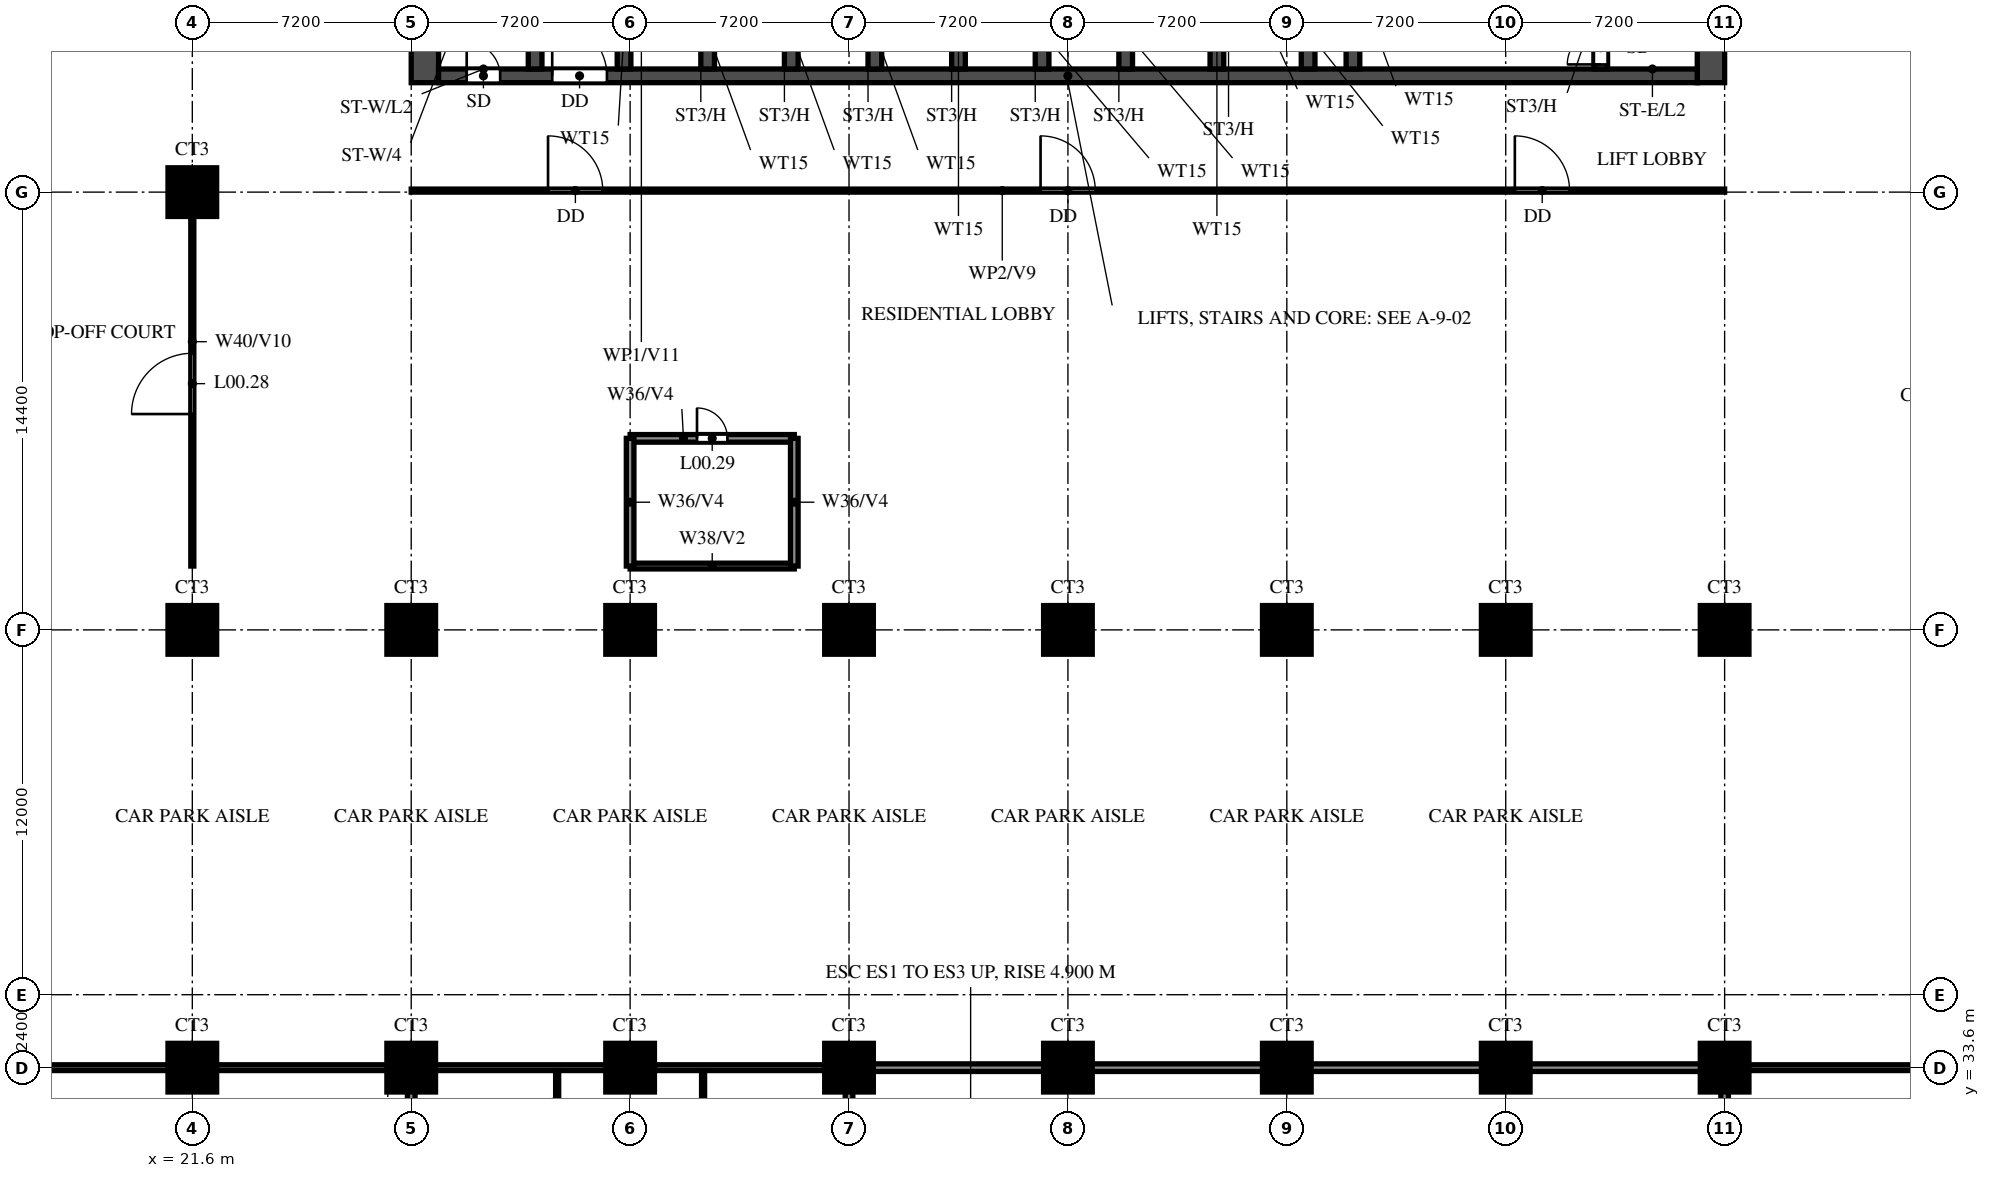
"""IFC4 building model, lengths in metres.
Left out: names, types, materials, properties, quantities, classifications, styles, units other than length and angle.
Written with IfcOpenShell. Run it as: python <this file> out.ifc"""

import sys

from ifc_helpers import new_model, si_unit, direction, frame, frame_2d, origin, origin_2d, place, context, subcontext, project, spatial, rectangle, circle, extrude, source, transform, mapped, element, fill, save


model = new_model("IFC4")
c1 = context("Model", 3, precision=1e-05, world=origin(), true_north=direction((0.0, 1.0)))
c2 = subcontext(c1, "Body", "Model", "MODEL_VIEW")
j1 = project(units=[si_unit("LENGTHUNIT", "METRE"), si_unit("PLANEANGLEUNIT", "RADIAN")], contexts=[c1])
p1 = place(None, origin())
s1 = spatial("IfcSite", under=j1, at=p1, CompositionType="ELEMENT")
p2 = place(p1, origin())
s2 = spatial("IfcBuilding", under=s1, at=p2, CompositionType="ELEMENT")
p3 = place(p2, origin())
s3 = spatial("IfcBuildingStorey", under=s2, at=p3, CompositionType="ELEMENT", Elevation=0.0)
m1 = source(origin(), c2, "Body", "SweptSolid", [
    extrude(circle(Radius=0.8, at=origin_2d()), origin(), (0.0, 0.0, 1.0), 7.4),
])
for number, where, z_axis, x_axis in (
    (1, (21.6, 33.6, 0.0), (0.0, 0.0, 1.0), (1.0, 0.0, 0.0)),
    (2, (28.8, 33.6, 0.0), (0.0, 0.0, 1.0), (1.0, 0.0, 0.0)),
    (3, (36.0, 33.6, 0.0), (0.0, 0.0, 1.0), (1.0, 0.0, 0.0)),
    (4, (43.2, 33.6, 0.0), (0.0, 0.0, 1.0), (1.0, 0.0, 0.0)),
    (5, (50.4, 33.6, 0.0), (0.0, 0.0, 1.0), (1.0, 0.0, 0.0)),
    (6, (57.6, 33.6, 0.0), (0.0, 0.0, 1.0), (1.0, 0.0, 0.0)),
    (7, (64.8, 33.6, 0.0), (0.0, 0.0, 1.0), (1.0, 0.0, 0.0)),
    (8, (72.0, 33.6, 0.0), (0.0, 0.0, 1.0), (1.0, 0.0, 0.0)),
    (9, (21.6, 48.0, 0.0), (0.0, 0.0, 1.0), (1.0, 0.0, 0.0)),
    (10, (28.8, 48.0, 0.0), (0.0, 0.0, 1.0), (1.0, 0.0, 0.0)),
    (11, (36.0, 48.0, 0.0), (0.0, 0.0, 1.0), (1.0, 0.0, 0.0)),
    (12, (43.2, 48.0, 0.0), (0.0, 0.0, 1.0), (1.0, 0.0, 0.0)),
    (13, (50.4, 48.0, 0.0), (0.0, 0.0, 1.0), (1.0, 0.0, 0.0)),
    (14, (57.6, 48.0, 0.0), (0.0, 0.0, 1.0), (1.0, 0.0, 0.0)),
    (15, (64.8, 48.0, 0.0), (0.0, 0.0, 1.0), (1.0, 0.0, 0.0)),
    (16, (72.0, 48.0, 0.0), (0.0, 0.0, 1.0), (1.0, 0.0, 0.0)),
    (17, (21.6, 62.4, 0.0), (0.0, 0.0, 1.0), (1.0, 0.0, 0.0)),
):
    element("IfcColumn", number, at=place(p3, frame(where, z_axis=z_axis, x_axis=x_axis)), inside=s3, PredefinedType="COLUMN", context=c2, shape_type="MappedRepresentation", body=[
        mapped(m1, transform((0.0, 0.0, 0.0))),
    ])
for number, where, z_axis, x_axis in (
    (18, (29.25, 66.0, 0.0), (0.0, 0.0, 1.0), (0.0, 1.0, 0.0)),
    (19, (71.55, 66.0, 0.0), (0.0, 0.0, 1.0), (0.0, 1.0, 0.0)),
):
    element("IfcWall", number, at=place(p3, frame(where, z_axis=z_axis, x_axis=x_axis)), inside=s3, PredefinedType="SHEAR", context=c2, shape_type="SweptSolid", body=[
        extrude(rectangle(XDim=12.0, YDim=0.9, at=frame_2d((6.0, 0.0))), origin(), (0.0, 0.0, 1.0), 7.4),
    ])
p4 = place(p3, frame((29.7, 66.225, 0.0), z_axis=(0.0, 0.0, 1.0), x_axis=(1.0, 0.0, 0.0)))
e20 = element("IfcWall", 20, at=p4, inside=s3, PredefinedType="SHEAR", context=c2, shape_type="SweptSolid", body=[
    extrude(rectangle(XDim=41.4, YDim=0.45, at=frame_2d((20.7, 0.0))), origin(), (0.0, 0.0, 1.0), 7.4),
])
p5 = place(p4, frame((0.925, 0.0, 0.0)))
e21 = element("IfcOpeningElement", 21, at=p5, cuts=e20, PredefinedType="OPENING", context=c2, shape_type="SweptSolid", body=[
    extrude(rectangle(XDim=1.1, YDim=2.1, at=frame_2d((0.55, 1.05))), frame((0.0, 0.235, 0.0), z_axis=(0.0, -1.0, 0.0), x_axis=(1.0, 0.0, 0.0)), (0.0, 0.0, 1.0), 0.47),
])
p6 = place(p4, frame((3.738, 0.0, 0.0)))
e22 = element("IfcOpeningElement", 22, at=p6, cuts=e20, PredefinedType="OPENING", context=c2, shape_type="SweptSolid", body=[
    extrude(rectangle(XDim=1.8, YDim=2.1, at=frame_2d((0.9, 1.05))), frame((0.0, 0.235, 0.0), z_axis=(0.0, -1.0, 0.0), x_axis=(1.0, 0.0, 0.0)), (0.0, 0.0, 1.0), 0.47),
])
p7 = place(p3, frame((32.875, 66.45, 0.0), z_axis=(0.0, 0.0, 1.0), x_axis=(0.0, 1.0, 0.0)))
e23 = element("IfcWall", 23, at=p7, inside=s3, PredefinedType="SHEAR", context=c2, shape_type="SweptSolid", body=[
    extrude(rectangle(XDim=10.65, YDim=0.45, at=frame_2d((5.325, 0.0))), origin(), (0.0, 0.0, 1.0), 7.4),
])
p8 = place(p3, frame((67.925, 66.45, 0.0), z_axis=(0.0, 0.0, 1.0), x_axis=(0.0, 1.0, 0.0)))
e24 = element("IfcWall", 24, at=p8, inside=s3, PredefinedType="SHEAR", context=c2, shape_type="SweptSolid", body=[
    extrude(rectangle(XDim=10.65, YDim=0.45, at=frame_2d((5.325, 0.0))), origin(), (0.0, 0.0, 1.0), 7.4),
])
p9 = place(p8, frame((0.15, 0.0, 0.0)))
e25 = element("IfcOpeningElement", 25, at=p9, cuts=e24, PredefinedType="OPENING", context=c2, shape_type="SweptSolid", body=[
    extrude(rectangle(XDim=1.1, YDim=2.1, at=frame_2d((0.55, 1.05))), frame((0.0, 0.235, 0.0), z_axis=(0.0, -1.0, 0.0), x_axis=(1.0, 0.0, 0.0)), (0.0, 0.0, 1.0), 0.47),
])
p10 = place(p3, frame((59.775, 66.45, 0.0), z_axis=(0.0, 0.0, 1.0), x_axis=(0.0, 1.0, 0.0)))
e26 = element("IfcWall", 26, at=p10, inside=s3, PredefinedType="SHEAR", context=c2, shape_type="SweptSolid", body=[
    extrude(rectangle(XDim=6.025, YDim=0.45, at=frame_2d((3.013, 0.0))), origin(), (0.0, 0.0, 1.0), 7.4),
])
p11 = place(p10, frame((3.85, 0.0, 0.0)))
e27 = element("IfcOpeningElement", 27, at=p11, cuts=e26, PredefinedType="OPENING", context=c2, shape_type="SweptSolid", body=[
    extrude(rectangle(XDim=1.2, YDim=2.1, at=frame_2d((0.6, 1.05))), frame((0.0, 0.235, 0.0), z_axis=(0.0, -1.0, 0.0), x_axis=(1.0, 0.0, 0.0)), (0.0, 0.0, 1.0), 0.47),
])
for number, where, z_axis, x_axis in (
    (28, (35.8, 66.45, 0.0), (0.0, 0.0, 1.0), (0.0, 1.0, 0.0)),
    (29, (38.55, 66.45, 0.0), (0.0, 0.0, 1.0), (0.0, 1.0, 0.0)),
    (30, (41.3, 66.45, 0.0), (0.0, 0.0, 1.0), (0.0, 1.0, 0.0)),
    (31, (44.05, 66.45, 0.0), (0.0, 0.0, 1.0), (0.0, 1.0, 0.0)),
    (32, (46.8, 66.45, 0.0), (0.0, 0.0, 1.0), (0.0, 1.0, 0.0)),
    (33, (49.55, 66.45, 0.0), (0.0, 0.0, 1.0), (0.0, 1.0, 0.0)),
    (34, (52.3, 66.45, 0.0), (0.0, 0.0, 1.0), (0.0, 1.0, 0.0)),
    (35, (55.3, 66.45, 0.0), (0.0, 0.0, 1.0), (0.0, 1.0, 0.0)),
    (36, (58.3, 66.45, 0.0), (0.0, 0.0, 1.0), (0.0, 1.0, 0.0)),
):
    element("IfcWall", number, at=place(p3, frame(where, z_axis=z_axis, x_axis=x_axis)), inside=s3, PredefinedType="SHEAR", context=c2, shape_type="SweptSolid", body=[
        extrude(rectangle(XDim=2.425, YDim=0.45, at=frame_2d((1.212, 0.0))), origin(), (0.0, 0.0, 1.0), 7.4),
    ])
p12 = place(p3, frame((28.8, 62.45, 0.0), z_axis=(0.0, 0.0, 1.0), x_axis=(1.0, 0.0, 0.0)))
e37 = element("IfcWall", 37, at=p12, inside=s3, PredefinedType="PARTITIONING", context=c2, shape_type="SweptSolid", body=[
    extrude(rectangle(XDim=43.2, YDim=0.1, at=frame_2d((21.6, 0.0))), origin(), (0.0, 0.0, 1.0), 7.4),
])
p13 = place(p12, frame((4.5, 0.0, 0.0)))
e38 = element("IfcOpeningElement", 38, at=p13, cuts=e37, PredefinedType="OPENING", context=c2, shape_type="SweptSolid", body=[
    extrude(rectangle(XDim=1.8, YDim=2.1, at=frame_2d((0.9, 1.05))), frame((0.0, 0.06, 0.0), z_axis=(0.0, -1.0, 0.0), x_axis=(1.0, 0.0, 0.0)), (0.0, 0.0, 1.0), 0.12),
])
p14 = place(p12, frame((20.7, 0.0, 0.0)))
e39 = element("IfcOpeningElement", 39, at=p14, cuts=e37, PredefinedType="OPENING", context=c2, shape_type="SweptSolid", body=[
    extrude(rectangle(XDim=1.8, YDim=2.1, at=frame_2d((0.9, 1.05))), frame((0.0, 0.06, 0.0), z_axis=(0.0, -1.0, 0.0), x_axis=(1.0, 0.0, 0.0)), (0.0, 0.0, 1.0), 0.12),
])
p15 = place(p12, frame((36.3, 0.0, 0.0)))
e40 = element("IfcOpeningElement", 40, at=p15, cuts=e37, PredefinedType="OPENING", context=c2, shape_type="SweptSolid", body=[
    extrude(rectangle(XDim=1.8, YDim=2.1, at=frame_2d((0.9, 1.05))), frame((0.0, 0.06, 0.0), z_axis=(0.0, -1.0, 0.0), x_axis=(1.0, 0.0, 0.0)), (0.0, 0.0, 1.0), 0.12),
])
p16 = place(p3, frame((14.4, 33.6, 0.0), z_axis=(0.0, 0.0, 1.0), x_axis=(1.0, 0.0, 0.0)))
e41 = element("IfcWall", 41, at=p16, inside=s3, PredefinedType="PARTITIONING", context=c2, shape_type="SweptSolid", body=[
    extrude(rectangle(XDim=28.8, YDim=0.19, at=frame_2d((14.4, 0.0))), origin(), (0.0, 0.0, 1.0), 6.5),
])
p17 = place(p3, frame((72.0, 33.6, 0.0), z_axis=(0.0, 0.0, 1.0), x_axis=(1.0, 0.0, 0.0)))
e42 = element("IfcWall", 42, at=p17, inside=s3, PredefinedType="PARTITIONING", context=c2, shape_type="SweptSolid", body=[
    extrude(rectangle(XDim=14.4, YDim=0.19, at=frame_2d((7.2, 0.0))), origin(), (0.0, 0.0, 1.0), 6.5),
])
p18 = place(p3, frame((43.2, 33.6, 0.0), z_axis=(0.0, 0.0, 1.0), x_axis=(1.0, 0.0, 0.0)))
e43 = element("IfcWall", 43, at=p18, inside=s3, PredefinedType="SOLIDWALL", context=c2, shape_type="SweptSolid", body=[
    extrude(rectangle(XDim=28.8, YDim=0.25, at=frame_2d((14.4, 0.0))), origin(), (0.0, 0.0, 1.0), 6.5),
])
p19 = place(p3, frame((36.0, 50.1, 0.0), z_axis=(0.0, 0.0, 1.0), x_axis=(1.0, 0.0, 0.0)))
e44 = element("IfcWall", 44, at=p19, inside=s3, PredefinedType="PARTITIONING", context=c2, shape_type="SweptSolid", body=[
    extrude(rectangle(XDim=5.4, YDim=0.19, at=frame_2d((2.7, 0.0))), origin(), (0.0, 0.0, 1.0), 7.4),
])
p20 = place(p3, frame((36.0, 54.3, 0.0), z_axis=(0.0, 0.0, 1.0), x_axis=(1.0, 0.0, 0.0)))
e45 = element("IfcWall", 45, at=p20, inside=s3, PredefinedType="SOLIDWALL", context=c2, shape_type="SweptSolid", body=[
    extrude(rectangle(XDim=5.4, YDim=0.25, at=frame_2d((2.7, 0.0))), origin(), (0.0, 0.0, 1.0), 7.4),
])
p21 = place(p20, frame((2.2, 0.0, 0.0)))
e46 = element("IfcOpeningElement", 46, at=p21, cuts=e45, PredefinedType="OPENING", context=c2, shape_type="SweptSolid", body=[
    extrude(rectangle(XDim=1.0, YDim=2.1, at=frame_2d((0.5, 1.05))), frame((0.0, 0.135, 0.0), z_axis=(0.0, -1.0, 0.0), x_axis=(1.0, 0.0, 0.0)), (0.0, 0.0, 1.0), 0.27),
])
p22 = place(p3, frame((21.6, 50.1, 0.0), z_axis=(0.0, 0.0, 1.0), x_axis=(0.0, 1.0, 0.0)))
e47 = element("IfcWall", 47, at=p22, inside=s3, PredefinedType="PARTITIONING", context=c2, shape_type="SweptSolid", body=[
    extrude(rectangle(XDim=12.3, YDim=0.1, at=frame_2d((6.15, 0.0))), origin(), (0.0, 0.0, 1.0), 6.2),
])
p23 = place(p22, frame((5.0, 0.0, 0.0)))
e48 = element("IfcOpeningElement", 48, at=p23, cuts=e47, PredefinedType="OPENING", context=c2, shape_type="SweptSolid", body=[
    extrude(rectangle(XDim=2.0, YDim=2.1, at=frame_2d((1.0, 1.05))), frame((0.0, 0.06, 0.0), z_axis=(0.0, -1.0, 0.0), x_axis=(1.0, 0.0, 0.0)), (0.0, 0.0, 1.0), 0.12),
])
p24 = place(p3, frame((28.8, 24.0, 0.0), z_axis=(0.0, 0.0, 1.0), x_axis=(0.0, 1.0, 0.0)))
e49 = element("IfcWall", 49, at=p24, inside=s3, PredefinedType="SOLIDWALL", context=c2, shape_type="SweptSolid", body=[
    extrude(rectangle(XDim=9.505, YDim=0.25, at=frame_2d((4.752, 0.0))), origin(), (0.0, 0.0, 1.0), 6.2),
])
p25 = place(p3, frame((33.6, 24.125, 0.0), z_axis=(0.0, 0.0, 1.0), x_axis=(0.0, 1.0, 0.0)))
e50 = element("IfcWall", 50, at=p25, inside=s3, PredefinedType="PARTITIONING", context=c2, shape_type="SweptSolid", body=[
    extrude(rectangle(XDim=9.38, YDim=0.1, at=frame_2d((4.69, 0.0))), origin(), (0.0, 0.0, 1.0), 7.4),
])
p26 = place(p25, frame((2.675, 0.0, 0.0)))
e51 = element("IfcOpeningElement", 51, at=p26, cuts=e50, PredefinedType="OPENING", context=c2, shape_type="SweptSolid", body=[
    extrude(rectangle(XDim=1.0, YDim=2.1, at=frame_2d((0.5, 1.05))), frame((0.0, 0.06, 0.0), z_axis=(0.0, -1.0, 0.0), x_axis=(1.0, 0.0, 0.0)), (0.0, 0.0, 1.0), 0.12),
])
p27 = place(p25, frame((7.475, 0.0, 0.0)))
e52 = element("IfcOpeningElement", 52, at=p27, cuts=e50, PredefinedType="OPENING", context=c2, shape_type="SweptSolid", body=[
    extrude(rectangle(XDim=1.0, YDim=2.1, at=frame_2d((0.5, 1.05))), frame((0.0, 0.06, 0.0), z_axis=(0.0, -1.0, 0.0), x_axis=(1.0, 0.0, 0.0)), (0.0, 0.0, 1.0), 0.12),
])
p28 = place(p3, frame((36.0, 50.1, 0.0), z_axis=(0.0, 0.0, 1.0), x_axis=(0.0, 1.0, 0.0)))
e53 = element("IfcWall", 53, at=p28, inside=s3, PredefinedType="SOLIDWALL", context=c2, shape_type="SweptSolid", body=[
    extrude(rectangle(XDim=4.2, YDim=0.25, at=frame_2d((2.1, 0.0))), origin(), (0.0, 0.0, 1.0), 7.4),
])
p29 = place(p3, frame((38.4, 24.125, 0.0), z_axis=(0.0, 0.0, 1.0), x_axis=(0.0, 1.0, 0.0)))
e54 = element("IfcWall", 54, at=p29, inside=s3, PredefinedType="PARTITIONING", context=c2, shape_type="SweptSolid", body=[
    extrude(rectangle(XDim=9.38, YDim=0.1, at=frame_2d((4.69, 0.0))), origin(), (0.0, 0.0, 1.0), 7.4),
])
p30 = place(p29, frame((4.175, 0.0, 0.0)))
e55 = element("IfcOpeningElement", 55, at=p30, cuts=e54, PredefinedType="OPENING", context=c2, shape_type="SweptSolid", body=[
    extrude(rectangle(XDim=1.0, YDim=2.1, at=frame_2d((0.5, 1.05))), frame((0.0, 0.06, 0.0), z_axis=(0.0, -1.0, 0.0), x_axis=(1.0, 0.0, 0.0)), (0.0, 0.0, 1.0), 0.12),
])
p31 = place(p3, frame((41.4, 50.1, 0.0), z_axis=(0.0, 0.0, 1.0), x_axis=(0.0, 1.0, 0.0)))
e56 = element("IfcWall", 56, at=p31, inside=s3, PredefinedType="SOLIDWALL", context=c2, shape_type="SweptSolid", body=[
    extrude(rectangle(XDim=4.2, YDim=0.25, at=frame_2d((2.1, 0.0))), origin(), (0.0, 0.0, 1.0), 7.4),
])
p32 = place(p3, frame((43.2, 24.0, 0.0), z_axis=(0.0, 0.0, 1.0), x_axis=(0.0, 1.0, 0.0)))
e57 = element("IfcWall", 57, at=p32, inside=s3, PredefinedType="SOLIDWALL", context=c2, shape_type="SweptSolid", body=[
    extrude(rectangle(XDim=9.6, YDim=0.25, at=frame_2d((4.8, 0.0))), origin(), (0.0, 0.0, 1.0), 6.2),
])
p33 = place(p3, frame((72.0, 21.6, 0.0), z_axis=(0.0, 0.0, 1.0), x_axis=(0.0, 1.0, 0.0)))
e58 = element("IfcWall", 58, at=p33, inside=s3, PredefinedType="SOLIDWALL", context=c2, shape_type="SweptSolid", body=[
    extrude(rectangle(XDim=12.0, YDim=0.25, at=frame_2d((6.0, 0.0))), origin(), (0.0, 0.0, 1.0), 6.2),
])
p34 = place(p5, origin())
e59 = element("IfcDoor", 59, at=p34, inside=s3, OperationType="SINGLE_SWING_LEFT", PredefinedType="DOOR", context=c2, shape_type="SweptSolid", body=[
    extrude(rectangle(XDim=1.1, YDim=2.1, at=frame_2d((0.55, 1.05))), frame((0.0, 0.025, 0.0), z_axis=(0.0, -1.0, 0.0), x_axis=(1.0, 0.0, 0.0)), (0.0, 0.0, 1.0), 0.05),
])
fill(e21, e59)
p35 = place(p9, origin())
e60 = element("IfcDoor", 60, at=p35, inside=s3, OperationType="SINGLE_SWING_LEFT", PredefinedType="DOOR", context=c2, shape_type="SweptSolid", body=[
    extrude(rectangle(XDim=1.1, YDim=2.1, at=frame_2d((0.55, 1.05))), frame((0.0, 0.025, 0.0), z_axis=(0.0, -1.0, 0.0), x_axis=(1.0, 0.0, 0.0)), (0.0, 0.0, 1.0), 0.05),
])
fill(e25, e60)
p36 = place(p6, origin())
e61 = element("IfcDoor", 61, at=p36, inside=s3, OperationType="DOUBLE_DOOR_SINGLE_SWING", PredefinedType="DOOR", context=c2, shape_type="SweptSolid", body=[
    extrude(rectangle(XDim=1.8, YDim=2.1, at=frame_2d((0.9, 1.05))), frame((0.0, 0.025, 0.0), z_axis=(0.0, -1.0, 0.0), x_axis=(1.0, 0.0, 0.0)), (0.0, 0.0, 1.0), 0.05),
])
fill(e22, e61)
p37 = place(p13, origin())
e62 = element("IfcDoor", 62, at=p37, inside=s3, OperationType="DOUBLE_DOOR_SINGLE_SWING", PredefinedType="DOOR", context=c2, shape_type="SweptSolid", body=[
    extrude(rectangle(XDim=1.8, YDim=2.1, at=frame_2d((0.9, 1.05))), frame((0.0, 0.025, 0.0), z_axis=(0.0, -1.0, 0.0), x_axis=(1.0, 0.0, 0.0)), (0.0, 0.0, 1.0), 0.05),
])
fill(e38, e62)
p38 = place(p14, origin())
e63 = element("IfcDoor", 63, at=p38, inside=s3, OperationType="DOUBLE_DOOR_SINGLE_SWING", PredefinedType="DOOR", context=c2, shape_type="SweptSolid", body=[
    extrude(rectangle(XDim=1.8, YDim=2.1, at=frame_2d((0.9, 1.05))), frame((0.0, 0.025, 0.0), z_axis=(0.0, -1.0, 0.0), x_axis=(1.0, 0.0, 0.0)), (0.0, 0.0, 1.0), 0.05),
])
fill(e39, e63)
p39 = place(p15, origin())
e64 = element("IfcDoor", 64, at=p39, inside=s3, OperationType="DOUBLE_DOOR_SINGLE_SWING", PredefinedType="DOOR", context=c2, shape_type="SweptSolid", body=[
    extrude(rectangle(XDim=1.8, YDim=2.1, at=frame_2d((0.9, 1.05))), frame((0.0, 0.025, 0.0), z_axis=(0.0, -1.0, 0.0), x_axis=(1.0, 0.0, 0.0)), (0.0, 0.0, 1.0), 0.05),
])
fill(e40, e64)
p40 = place(p23, origin())
e65 = element("IfcDoor", 65, at=p40, inside=s3, OperationType="DOUBLE_DOOR_SINGLE_SWING", PredefinedType="DOOR", context=c2, shape_type="SweptSolid", body=[
    extrude(rectangle(XDim=2.0, YDim=2.1, at=frame_2d((1.0, 1.05))), frame((0.0, 0.025, 0.0), z_axis=(0.0, -1.0, 0.0), x_axis=(1.0, 0.0, 0.0)), (0.0, 0.0, 1.0), 0.05),
])
fill(e48, e65)
p41 = place(p21, origin())
e66 = element("IfcDoor", 66, at=p41, inside=s3, OperationType="SINGLE_SWING_RIGHT", PredefinedType="DOOR", context=c2, shape_type="SweptSolid", body=[
    extrude(rectangle(XDim=1.0, YDim=2.1, at=frame_2d((0.5, 1.05))), frame((0.0, 0.025, 0.0), z_axis=(0.0, -1.0, 0.0), x_axis=(1.0, 0.0, 0.0)), (0.0, 0.0, 1.0), 0.05),
])
fill(e46, e66)
save(model, sys.argv[1])
